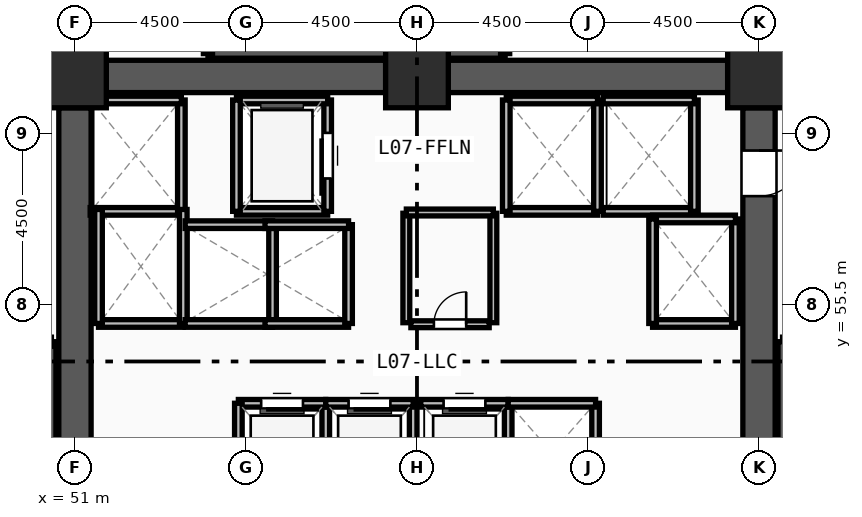
"""IFC4 building model, lengths in metres.
Left out: names, types, materials, properties, quantities, classifications, styles, units other than length and angle.
Written with IfcOpenShell. Run it as: python <this file> out.ifc"""

import sys

from ifc_helpers import new_model, si_unit, direction, frame, frame_2d, origin, origin_2d, place, context, subcontext, project, spatial, rectangle, extrude, source, transform, mapped, element, fill, save


model = new_model("IFC4")
c1 = context("Model", 3, precision=1e-05, world=origin(), true_north=direction((0.0, 1.0)))
c2 = subcontext(c1, "Body", "Model", "MODEL_VIEW")
j1 = project(units=[si_unit("LENGTHUNIT", "METRE"), si_unit("PLANEANGLEUNIT", "RADIAN")], contexts=[c1])
p1 = place(None, origin())
s1 = spatial("IfcSite", under=j1, at=p1, CompositionType="ELEMENT")
p2 = place(p1, origin())
s2 = spatial("IfcBuilding", under=s1, at=p2, CompositionType="ELEMENT")
p3 = place(p2, frame((0.0, 0.0, 28.5)))
s3 = spatial("IfcBuildingStorey", under=s2, at=p3, CompositionType="ELEMENT", Elevation=28.5)
m1 = source(origin(), c2, "Body", "SweptSolid", [
    extrude(rectangle(XDim=1.65, YDim=1.65, at=origin_2d()), origin(), (0.0, 0.0, 1.0), 3.75),
])
for number, where, z_axis, x_axis in (
    (1, (69.0, 61.5, 0.0), (0.0, 0.0, 1.0), (1.0, 0.0, 0.0)),
    (2, (60.0, 61.5, 0.0), (0.0, 0.0, 1.0), (1.0, 0.0, 0.0)),
    (3, (51.0, 61.5, 0.0), (0.0, 0.0, 1.0), (1.0, 0.0, 0.0)),
):
    element("IfcColumn", number, at=place(p3, frame(where, z_axis=z_axis, x_axis=x_axis)), inside=s3, PredefinedType="COLUMN", context=c2, shape_type="MappedRepresentation", body=[
        mapped(m1, transform((0.0, 0.0, 0.0), x_axis=(1.0, 0.0, 0.0), y_axis=(0.0, 1.0, 0.0), z_axis=(0.0, 0.0, 1.0), scale=1.0)),
    ])
for number, where, z_axis, x_axis in (
    (4, (51.825, 61.5, 0.0), (0.0, 0.0, 1.0), (1.0, 0.0, 0.0)),
    (5, (60.825, 61.5, 0.0), (0.0, 0.0, 1.0), (1.0, 0.0, 0.0)),
):
    element("IfcWall", number, at=place(p3, frame(where, z_axis=z_axis, x_axis=x_axis)), inside=s3, PredefinedType="SHEAR", context=c2, shape_type="SweptSolid", body=[
        extrude(rectangle(XDim=7.35, YDim=0.85, at=frame_2d((3.675, 0.0))), origin(), (0.0, 0.0, 1.0), 3.57),
    ])
p4 = place(p3, frame((69.0, 60.675, 0.0), z_axis=(0.0, 0.0, 1.0), x_axis=(0.0, -1.0, 0.0)))
e6 = element("IfcWall", 6, at=p4, inside=s3, PredefinedType="SHEAR", context=c2, shape_type="SweptSolid", body=[
    extrude(rectangle(XDim=13.35, YDim=0.85, at=frame_2d((6.675, 0.0))), origin(), (0.0, 0.0, 1.0), 3.57),
])
m2 = source(origin(), c2, "Body", "SweptSolid", [
    extrude(rectangle(XDim=1.2, YDim=2.2, at=frame_2d((0.6, 1.1))), frame((0.0, 0.435, 0.0), z_axis=(0.0, -1.0, 0.0), x_axis=(1.0, 0.0, 0.0)), (0.0, 0.0, 1.0), 0.87),
])
p5 = place(p4, frame((1.125, 0.0, 0.0)))
e7 = element("IfcOpeningElement", 7, at=p5, cuts=e6, PredefinedType="OPENING", context=c2, shape_type="MappedRepresentation", body=[
    mapped(m2, transform((0.0, 0.0, 0.0), x_axis=(1.0, 0.0, 0.0), y_axis=(0.0, 1.0, 0.0), z_axis=(0.0, 0.0, 1.0), scale=1.0)),
])
p6 = place(p3, frame((51.0, 47.325, 0.0), z_axis=(0.0, 0.0, 1.0), x_axis=(0.0, 1.0, 0.0)))
e8 = element("IfcWall", 8, at=p6, inside=s3, PredefinedType="SHEAR", context=c2, shape_type="SweptSolid", body=[
    extrude(rectangle(XDim=13.35, YDim=0.85, at=frame_2d((6.675, 0.0))), origin(), (0.0, 0.0, 1.0), 3.57),
])
for number, where, z_axis, x_axis in (
    (9, (50.38, 46.7, 0.0), (0.0, 0.0, 1.0), (0.0, 1.0, 0.0)),
    (10, (69.62, 54.52, 0.0), (0.0, 0.0, 1.0), (0.0, -1.0, 0.0)),
    (11, (54.5, 62.1, 0.0), (0.0, 0.0, 1.0), (1.0, 0.0, 0.0)),
):
    element("IfcWall", number, at=place(p3, frame(where, z_axis=z_axis, x_axis=x_axis)), inside=s3, PredefinedType="SOLIDWALL", context=c2, shape_type="SweptSolid", body=[
        extrude(rectangle(XDim=7.82, YDim=0.24, at=frame_2d((3.91, 0.0))), origin(), (0.0, 0.0, 1.0), 3.57),
    ])
for number, where, z_axis, x_axis in (
    (12, (62.32, 62.1, 0.0), (0.0, 0.0, 1.0), (0.0, 1.0, 0.0)),
    (13, (54.5, 65.54, 0.0), (0.0, 0.0, 1.0), (0.0, -1.0, 0.0)),
):
    element("IfcWall", number, at=place(p3, frame(where, z_axis=z_axis, x_axis=x_axis)), inside=s3, PredefinedType="SOLIDWALL", context=c2, shape_type="SweptSolid", body=[
        extrude(rectangle(XDim=3.44, YDim=0.24, at=frame_2d((1.72, 0.0))), origin(), (0.0, 0.0, 1.0), 3.57),
    ])
p7 = place(p3, frame((55.25, 57.95, 0.0), z_axis=(0.0, 0.0, 1.0), x_axis=(1.0, 0.0, 0.0)))
e14 = element("IfcWall", 14, at=p7, inside=s3, PredefinedType="SOLIDWALL", context=c2, shape_type="SweptSolid", body=[
    extrude(rectangle(XDim=2.4, YDim=0.2, at=frame_2d((1.2, 0.0))), origin(), (0.0, 0.0, 1.0), 3.57),
])
p8 = place(p3, frame((57.65, 57.95, 0.0), z_axis=(0.0, 0.0, 1.0), x_axis=(0.0, 1.0, 0.0)))
e15 = element("IfcWall", 15, at=p8, inside=s3, PredefinedType="SOLIDWALL", context=c2, shape_type="SweptSolid", body=[
    extrude(rectangle(XDim=2.93, YDim=0.2, at=frame_2d((1.465, 0.0))), origin(), (0.0, 0.0, 1.0), 3.57),
])
m3 = source(origin(), c2, "Body", "SweptSolid", [
    extrude(rectangle(XDim=1.2, YDim=2.3, at=frame_2d((0.6, 1.15))), frame((0.0, 0.11, 0.0), z_axis=(0.0, -1.0, 0.0), x_axis=(1.0, 0.0, 0.0)), (0.0, 0.0, 1.0), 0.22),
])
p9 = place(p8, frame((0.865, 0.0, 0.0)))
e16 = element("IfcOpeningElement", 16, at=p9, cuts=e15, PredefinedType="OPENING", context=c2, shape_type="MappedRepresentation", body=[
    mapped(m3, transform((0.0, 0.0, 0.0), x_axis=(1.0, 0.0, 0.0), y_axis=(0.0, 1.0, 0.0), z_axis=(0.0, 0.0, 1.0), scale=1.0)),
])
p10 = place(p3, frame((57.65, 60.88, 0.0), z_axis=(0.0, 0.0, 1.0), x_axis=(-1.0, 0.0, 0.0)))
e17 = element("IfcWall", 17, at=p10, inside=s3, PredefinedType="SOLIDWALL", context=c2, shape_type="SweptSolid", body=[
    extrude(rectangle(XDim=2.4, YDim=0.2, at=frame_2d((1.2, 0.0))), origin(), (0.0, 0.0, 1.0), 3.57),
])
p11 = place(p3, frame((55.25, 60.88, 0.0), z_axis=(0.0, 0.0, 1.0), x_axis=(0.0, -1.0, 0.0)))
e18 = element("IfcWall", 18, at=p11, inside=s3, PredefinedType="SOLIDWALL", context=c2, shape_type="SweptSolid", body=[
    extrude(rectangle(XDim=2.93, YDim=0.2, at=frame_2d((1.465, 0.0))), origin(), (0.0, 0.0, 1.0), 3.57),
])
p12 = place(p3, frame((62.35, 57.95, 0.0), z_axis=(0.0, 0.0, 1.0), x_axis=(1.0, 0.0, 0.0)))
e19 = element("IfcWall", 19, at=p12, inside=s3, PredefinedType="SOLIDWALL", context=c2, shape_type="SweptSolid", body=[
    extrude(rectangle(XDim=2.4, YDim=0.2, at=frame_2d((1.2, 0.0))), origin(), (0.0, 0.0, 1.0), 3.57),
])
p13 = place(p3, frame((64.75, 57.95, 0.0), z_axis=(0.0, 0.0, 1.0), x_axis=(0.0, 1.0, 0.0)))
e20 = element("IfcWall", 20, at=p13, inside=s3, PredefinedType="SOLIDWALL", context=c2, shape_type="SweptSolid", body=[
    extrude(rectangle(XDim=2.93, YDim=0.2, at=frame_2d((1.465, 0.0))), origin(), (0.0, 0.0, 1.0), 3.57),
])
p14 = place(p3, frame((64.75, 60.88, 0.0), z_axis=(0.0, 0.0, 1.0), x_axis=(-1.0, 0.0, 0.0)))
e21 = element("IfcWall", 21, at=p14, inside=s3, PredefinedType="SOLIDWALL", context=c2, shape_type="SweptSolid", body=[
    extrude(rectangle(XDim=2.4, YDim=0.2, at=frame_2d((1.2, 0.0))), origin(), (0.0, 0.0, 1.0), 3.57),
])
p15 = place(p3, frame((62.35, 60.88, 0.0), z_axis=(0.0, 0.0, 1.0), x_axis=(0.0, -1.0, 0.0)))
e22 = element("IfcWall", 22, at=p15, inside=s3, PredefinedType="SOLIDWALL", context=c2, shape_type="SweptSolid", body=[
    extrude(rectangle(XDim=2.93, YDim=0.2, at=frame_2d((1.465, 0.0))), origin(), (0.0, 0.0, 1.0), 3.57),
])
p16 = place(p3, frame((64.9, 57.95, 0.0), z_axis=(0.0, 0.0, 1.0), x_axis=(1.0, 0.0, 0.0)))
e23 = element("IfcWall", 23, at=p16, inside=s3, PredefinedType="SOLIDWALL", context=c2, shape_type="SweptSolid", body=[
    extrude(rectangle(XDim=2.4, YDim=0.2, at=frame_2d((1.2, 0.0))), origin(), (0.0, 0.0, 1.0), 3.57),
])
p17 = place(p3, frame((67.3, 57.95, 0.0), z_axis=(0.0, 0.0, 1.0), x_axis=(0.0, 1.0, 0.0)))
e24 = element("IfcWall", 24, at=p17, inside=s3, PredefinedType="SOLIDWALL", context=c2, shape_type="SweptSolid", body=[
    extrude(rectangle(XDim=2.93, YDim=0.2, at=frame_2d((1.465, 0.0))), origin(), (0.0, 0.0, 1.0), 3.57),
])
for number, where, z_axis, x_axis in (
    (25, (67.3, 60.88, 0.0), (0.0, 0.0, 1.0), (-1.0, 0.0, 0.0)),
    (26, (51.4, 57.95, 0.0), (0.0, 0.0, 1.0), (1.0, 0.0, 0.0)),
):
    element("IfcWall", number, at=place(p3, frame(where, z_axis=z_axis, x_axis=x_axis)), inside=s3, PredefinedType="SOLIDWALL", context=c2, shape_type="SweptSolid", body=[
        extrude(rectangle(XDim=2.4, YDim=0.2, at=frame_2d((1.2, 0.0))), origin(), (0.0, 0.0, 1.0), 3.57),
    ])
p18 = place(p3, frame((53.8, 57.95, 0.0), z_axis=(0.0, 0.0, 1.0), x_axis=(0.0, 1.0, 0.0)))
e27 = element("IfcWall", 27, at=p18, inside=s3, PredefinedType="SOLIDWALL", context=c2, shape_type="SweptSolid", body=[
    extrude(rectangle(XDim=2.93, YDim=0.2, at=frame_2d((1.465, 0.0))), origin(), (0.0, 0.0, 1.0), 3.57),
])
p19 = place(p3, frame((53.8, 60.88, 0.0), z_axis=(0.0, 0.0, 1.0), x_axis=(-1.0, 0.0, 0.0)))
e28 = element("IfcWall", 28, at=p19, inside=s3, PredefinedType="SOLIDWALL", context=c2, shape_type="SweptSolid", body=[
    extrude(rectangle(XDim=2.4, YDim=0.2, at=frame_2d((1.2, 0.0))), origin(), (0.0, 0.0, 1.0), 3.57),
])
p20 = place(p3, frame((51.62, 55.0, 0.0), z_axis=(0.0, 0.0, 1.0), x_axis=(1.0, 0.0, 0.0)))
e29 = element("IfcWall", 29, at=p20, inside=s3, PredefinedType="SOLIDWALL", context=c2, shape_type="SweptSolid", body=[
    extrude(rectangle(XDim=2.23, YDim=0.2, at=frame_2d((1.115, 0.0))), origin(), (0.0, 0.0, 1.0), 3.57),
])
for number, where, z_axis, x_axis in (
    (30, (53.85, 55.0, 0.0), (0.0, 0.0, 1.0), (0.0, 1.0, 0.0)),
    (31, (51.62, 58.0, 0.0), (0.0, 0.0, 1.0), (0.0, -1.0, 0.0)),
):
    element("IfcWall", number, at=place(p3, frame(where, z_axis=z_axis, x_axis=x_axis)), inside=s3, PredefinedType="SOLIDWALL", context=c2, shape_type="SweptSolid", body=[
        extrude(rectangle(XDim=3.0, YDim=0.2, at=frame_2d((1.5, 0.0))), origin(), (0.0, 0.0, 1.0), 3.57),
    ])
p21 = place(p3, frame((66.2, 55.0, 0.0), z_axis=(0.0, 0.0, 1.0), x_axis=(1.0, 0.0, 0.0)))
e32 = element("IfcWall", 32, at=p21, inside=s3, PredefinedType="SOLIDWALL", context=c2, shape_type="SweptSolid", body=[
    extrude(rectangle(XDim=2.18, YDim=0.2, at=frame_2d((1.09, 0.0))), origin(), (0.0, 0.0, 1.0), 3.57),
])
p22 = place(p3, frame((68.38, 55.0, 0.0), z_axis=(0.0, 0.0, 1.0), x_axis=(0.0, 1.0, 0.0)))
e33 = element("IfcWall", 33, at=p22, inside=s3, PredefinedType="SOLIDWALL", context=c2, shape_type="SweptSolid", body=[
    extrude(rectangle(XDim=2.75, YDim=0.2, at=frame_2d((1.375, 0.0))), origin(), (0.0, 0.0, 1.0), 3.57),
])
p23 = place(p3, frame((68.38, 57.75, 0.0), z_axis=(0.0, 0.0, 1.0), x_axis=(-1.0, 0.0, 0.0)))
e34 = element("IfcWall", 34, at=p23, inside=s3, PredefinedType="SOLIDWALL", context=c2, shape_type="SweptSolid", body=[
    extrude(rectangle(XDim=2.18, YDim=0.2, at=frame_2d((1.09, 0.0))), origin(), (0.0, 0.0, 1.0), 3.57),
])
p24 = place(p3, frame((66.2, 57.75, 0.0), z_axis=(0.0, 0.0, 1.0), x_axis=(0.0, -1.0, 0.0)))
e35 = element("IfcWall", 35, at=p24, inside=s3, PredefinedType="SOLIDWALL", context=c2, shape_type="SweptSolid", body=[
    extrude(rectangle(XDim=2.75, YDim=0.2, at=frame_2d((1.375, 0.0))), origin(), (0.0, 0.0, 1.0), 3.57),
])
p25 = place(p3, frame((57.6, 50.3, 0.0), z_axis=(0.0, 0.0, 1.0), x_axis=(0.0, 1.0, 0.0)))
e36 = element("IfcWall", 36, at=p25, inside=s3, PredefinedType="SOLIDWALL", context=c2, shape_type="SweptSolid", body=[
    extrude(rectangle(XDim=2.6, YDim=0.2, at=frame_2d((1.3, 0.0))), origin(), (0.0, 0.0, 1.0), 3.57),
])
p26 = place(p3, frame((57.6, 52.9, 0.0), z_axis=(0.0, 0.0, 1.0), x_axis=(-1.0, 0.0, 0.0)))
e37 = element("IfcWall", 37, at=p26, inside=s3, PredefinedType="SOLIDWALL", context=c2, shape_type="SweptSolid", body=[
    extrude(rectangle(XDim=2.3, YDim=0.2, at=frame_2d((1.15, 0.0))), origin(), (0.0, 0.0, 1.0), 3.57),
])
m4 = source(origin(), c2, "Body", "SweptSolid", [
    extrude(rectangle(XDim=1.1, YDim=2.2, at=frame_2d((0.55, 1.1))), frame((0.0, 0.11, 0.0), z_axis=(0.0, -1.0, 0.0), x_axis=(1.0, 0.0, 0.0)), (0.0, 0.0, 1.0), 0.22),
])
p27 = place(p26, frame((0.6, 0.0, 0.0)))
e38 = element("IfcOpeningElement", 38, at=p27, cuts=e37, PredefinedType="OPENING", context=c2, shape_type="MappedRepresentation", body=[
    mapped(m4, transform((0.0, 0.0, 0.0), x_axis=(1.0, 0.0, 0.0), y_axis=(0.0, 1.0, 0.0), z_axis=(0.0, 0.0, 1.0), scale=1.0)),
])
for number, where, z_axis, x_axis in (
    (39, (55.3, 52.9, 0.0), (0.0, 0.0, 1.0), (0.0, -1.0, 0.0)),
    (40, (59.9, 50.3, 0.0), (0.0, 0.0, 1.0), (0.0, 1.0, 0.0)),
):
    element("IfcWall", number, at=place(p3, frame(where, z_axis=z_axis, x_axis=x_axis)), inside=s3, PredefinedType="SOLIDWALL", context=c2, shape_type="SweptSolid", body=[
        extrude(rectangle(XDim=2.6, YDim=0.2, at=frame_2d((1.3, 0.0))), origin(), (0.0, 0.0, 1.0), 3.57),
    ])
p28 = place(p3, frame((59.9, 52.9, 0.0), z_axis=(0.0, 0.0, 1.0), x_axis=(-1.0, 0.0, 0.0)))
e41 = element("IfcWall", 41, at=p28, inside=s3, PredefinedType="SOLIDWALL", context=c2, shape_type="SweptSolid", body=[
    extrude(rectangle(XDim=2.3, YDim=0.2, at=frame_2d((1.15, 0.0))), origin(), (0.0, 0.0, 1.0), 3.57),
])
p29 = place(p28, frame((0.6, 0.0, 0.0)))
e42 = element("IfcOpeningElement", 42, at=p29, cuts=e41, PredefinedType="OPENING", context=c2, shape_type="MappedRepresentation", body=[
    mapped(m4, transform((0.0, 0.0, 0.0), x_axis=(1.0, 0.0, 0.0), y_axis=(0.0, 1.0, 0.0), z_axis=(0.0, 0.0, 1.0), scale=1.0)),
])
p30 = place(p3, frame((62.4, 50.3, 0.0), z_axis=(0.0, 0.0, 1.0), x_axis=(0.0, 1.0, 0.0)))
e43 = element("IfcWall", 43, at=p30, inside=s3, PredefinedType="SOLIDWALL", context=c2, shape_type="SweptSolid", body=[
    extrude(rectangle(XDim=2.6, YDim=0.2, at=frame_2d((1.3, 0.0))), origin(), (0.0, 0.0, 1.0), 3.57),
])
p31 = place(p3, frame((62.4, 52.9, 0.0), z_axis=(0.0, 0.0, 1.0), x_axis=(-1.0, 0.0, 0.0)))
e44 = element("IfcWall", 44, at=p31, inside=s3, PredefinedType="SOLIDWALL", context=c2, shape_type="SweptSolid", body=[
    extrude(rectangle(XDim=2.3, YDim=0.2, at=frame_2d((1.15, 0.0))), origin(), (0.0, 0.0, 1.0), 3.57),
])
p32 = place(p31, frame((0.6, 0.0, 0.0)))
e45 = element("IfcOpeningElement", 45, at=p32, cuts=e44, PredefinedType="OPENING", context=c2, shape_type="MappedRepresentation", body=[
    mapped(m4, transform((0.0, 0.0, 0.0), x_axis=(1.0, 0.0, 0.0), y_axis=(0.0, 1.0, 0.0), z_axis=(0.0, 0.0, 1.0), scale=1.0)),
])
p33 = place(p3, frame((64.7, 50.3, 0.0), z_axis=(0.0, 0.0, 1.0), x_axis=(0.0, 1.0, 0.0)))
e46 = element("IfcWall", 46, at=p33, inside=s3, PredefinedType="SOLIDWALL", context=c2, shape_type="SweptSolid", body=[
    extrude(rectangle(XDim=2.6, YDim=0.2, at=frame_2d((1.3, 0.0))), origin(), (0.0, 0.0, 1.0), 3.57),
])
for number, where, z_axis, x_axis in (
    (47, (64.7, 52.9, 0.0), (0.0, 0.0, 1.0), (-1.0, 0.0, 0.0)),
    (48, (53.9, 55.0, 0.0), (0.0, 0.0, 1.0), (1.0, 0.0, 0.0)),
):
    element("IfcWall", number, at=place(p3, frame(where, z_axis=z_axis, x_axis=x_axis)), inside=s3, PredefinedType="SOLIDWALL", context=c2, shape_type="SweptSolid", body=[
        extrude(rectangle(XDim=2.3, YDim=0.2, at=frame_2d((1.15, 0.0))), origin(), (0.0, 0.0, 1.0), 3.57),
    ])
p34 = place(p3, frame((56.2, 55.0, 0.0), z_axis=(0.0, 0.0, 1.0), x_axis=(0.0, 1.0, 0.0)))
e49 = element("IfcWall", 49, at=p34, inside=s3, PredefinedType="SOLIDWALL", context=c2, shape_type="SweptSolid", body=[
    extrude(rectangle(XDim=2.6, YDim=0.2, at=frame_2d((1.3, 0.0))), origin(), (0.0, 0.0, 1.0), 3.57),
])
p35 = place(p3, frame((56.2, 57.6, 0.0), z_axis=(0.0, 0.0, 1.0), x_axis=(-1.0, 0.0, 0.0)))
e50 = element("IfcWall", 50, at=p35, inside=s3, PredefinedType="SOLIDWALL", context=c2, shape_type="SweptSolid", body=[
    extrude(rectangle(XDim=2.3, YDim=0.2, at=frame_2d((1.15, 0.0))), origin(), (0.0, 0.0, 1.0), 3.57),
])
p36 = place(p3, frame((56.0, 55.0, 0.0), z_axis=(0.0, 0.0, 1.0), x_axis=(1.0, 0.0, 0.0)))
e51 = element("IfcWall", 51, at=p36, inside=s3, PredefinedType="SOLIDWALL", context=c2, shape_type="SweptSolid", body=[
    extrude(rectangle(XDim=2.2, YDim=0.2, at=frame_2d((1.1, 0.0))), origin(), (0.0, 0.0, 1.0), 3.57),
])
p37 = place(p3, frame((58.2, 55.0, 0.0), z_axis=(0.0, 0.0, 1.0), x_axis=(0.0, 1.0, 0.0)))
e52 = element("IfcWall", 52, at=p37, inside=s3, PredefinedType="SOLIDWALL", context=c2, shape_type="SweptSolid", body=[
    extrude(rectangle(XDim=2.6, YDim=0.2, at=frame_2d((1.3, 0.0))), origin(), (0.0, 0.0, 1.0), 3.57),
])
p38 = place(p3, frame((58.2, 57.6, 0.0), z_axis=(0.0, 0.0, 1.0), x_axis=(-1.0, 0.0, 0.0)))
e53 = element("IfcWall", 53, at=p38, inside=s3, PredefinedType="SOLIDWALL", context=c2, shape_type="SweptSolid", body=[
    extrude(rectangle(XDim=2.2, YDim=0.2, at=frame_2d((1.1, 0.0))), origin(), (0.0, 0.0, 1.0), 3.57),
])
p39 = place(p3, frame((59.84, 54.98, 0.0), z_axis=(0.0, 0.0, 1.0), x_axis=(1.0, 0.0, 0.0)))
e54 = element("IfcWall", 54, at=p39, inside=s3, PredefinedType="PARTITIONING", context=c2, shape_type="SweptSolid", body=[
    extrude(rectangle(XDim=2.06, YDim=0.18, at=frame_2d((1.03, 0.0))), origin(), (0.0, 0.0, 1.0), 3.57),
])
m5 = source(origin(), c2, "Body", "SweptSolid", [
    extrude(rectangle(XDim=0.85, YDim=2.1, at=frame_2d((0.425, 1.05))), frame((0.0, 0.1, 0.0), z_axis=(0.0, -1.0, 0.0), x_axis=(1.0, 0.0, 0.0)), (0.0, 0.0, 1.0), 0.2),
])
p40 = place(p39, frame((0.605, 0.0, 0.0)))
e55 = element("IfcOpeningElement", 55, at=p40, cuts=e54, PredefinedType="OPENING", context=c2, shape_type="MappedRepresentation", body=[
    mapped(m5, transform((0.0, 0.0, 0.0), x_axis=(1.0, 0.0, 0.0), y_axis=(0.0, 1.0, 0.0), z_axis=(0.0, 0.0, 1.0), scale=1.0)),
])
for number, where, z_axis, x_axis in (
    (56, (59.72, 55.02, 0.0), (0.0, 0.0, 1.0), (0.0, 1.0, 0.0)),
    (57, (62.01, 55.02, 0.0), (0.0, 0.0, 1.0), (0.0, 1.0, 0.0)),
):
    element("IfcWall", number, at=place(p3, frame(where, z_axis=z_axis, x_axis=x_axis)), inside=s3, PredefinedType="PARTITIONING", context=c2, shape_type="SweptSolid", body=[
        extrude(rectangle(XDim=2.88, YDim=0.18, at=frame_2d((1.44, 0.0))), origin(), (0.0, 0.0, 1.0), 3.57),
    ])
p41 = place(p3, frame((59.72, 57.92, 0.0), z_axis=(0.0, 0.0, 1.0), x_axis=(1.0, 0.0, 0.0)))
e58 = element("IfcWall", 58, at=p41, inside=s3, PredefinedType="PARTITIONING", context=c2, shape_type="SweptSolid", body=[
    extrude(rectangle(XDim=2.29, YDim=0.18, at=frame_2d((1.145, 0.0))), origin(), (0.0, 0.0, 1.0), 3.57),
])
for number, where, z_axis, x_axis in (
    (59, (50.54, 61.95, 0.0), (0.0, 0.0, 1.0), (0.0, 1.0, 0.0)),
    (60, (69.46, 61.95, 0.0), (0.0, 0.0, 1.0), (0.0, 1.0, 0.0)),
):
    element("IfcWall", number, at=place(p3, frame(where, z_axis=z_axis, x_axis=x_axis)), inside=s3, PredefinedType="PARTITIONING", context=c2, shape_type="SweptSolid", body=[
        extrude(rectangle(XDim=3.63, YDim=0.18, at=frame_2d((1.815, 0.0))), origin(), (0.0, 0.0, 1.0), 3.57),
    ])
m6 = source(origin(), c2, "Body", "SweptSolid", [
    extrude(rectangle(XDim=1.2, YDim=2.2, at=frame_2d((0.6, 1.1))), frame((0.0, 0.025, 0.0), z_axis=(0.0, -1.0, 0.0), x_axis=(1.0, 0.0, 0.0)), (0.0, 0.0, 1.0), 0.05),
])
p42 = place(p5, origin())
e61 = element("IfcDoor", 61, at=p42, inside=s3, OperationType="SINGLE_SWING_LEFT", PredefinedType="DOOR", context=c2, shape_type="MappedRepresentation", body=[
    mapped(m6, transform((0.0, 0.0, 0.0), x_axis=(1.0, 0.0, 0.0), y_axis=(0.0, 1.0, 0.0), z_axis=(0.0, 0.0, 1.0), scale=1.0)),
])
fill(e7, e61)
m7 = source(origin(), c2, "Body", "SweptSolid", [
    extrude(rectangle(XDim=1.2, YDim=2.3, at=frame_2d((0.6, 1.15))), frame((0.0, 0.025, 0.0), z_axis=(0.0, -1.0, 0.0), x_axis=(1.0, 0.0, 0.0)), (0.0, 0.0, 1.0), 0.05),
])
p43 = place(p9, origin())
e62 = element("IfcDoor", 62, at=p43, inside=s3, OperationType="SLIDING_TO_LEFT", PredefinedType="DOOR", context=c2, shape_type="MappedRepresentation", body=[
    mapped(m7, transform((0.0, 0.0, 0.0), x_axis=(1.0, 0.0, 0.0), y_axis=(0.0, 1.0, 0.0), z_axis=(0.0, 0.0, 1.0), scale=1.0)),
])
fill(e16, e62)
m8 = source(origin(), c2, "Body", "SweptSolid", [
    extrude(rectangle(XDim=1.1, YDim=2.2, at=frame_2d((0.55, 1.1))), frame((0.0, 0.025, 0.0), z_axis=(0.0, -1.0, 0.0), x_axis=(1.0, 0.0, 0.0)), (0.0, 0.0, 1.0), 0.05),
])
p44 = place(p27, origin())
e63 = element("IfcDoor", 63, at=p44, inside=s3, OperationType="SLIDING_TO_LEFT", PredefinedType="DOOR", context=c2, shape_type="MappedRepresentation", body=[
    mapped(m8, transform((0.0, 0.0, 0.0), x_axis=(1.0, 0.0, 0.0), y_axis=(0.0, 1.0, 0.0), z_axis=(0.0, 0.0, 1.0), scale=1.0)),
])
fill(e38, e63)
p45 = place(p29, origin())
e64 = element("IfcDoor", 64, at=p45, inside=s3, OperationType="SLIDING_TO_LEFT", PredefinedType="DOOR", context=c2, shape_type="MappedRepresentation", body=[
    mapped(m8, transform((0.0, 0.0, 0.0), x_axis=(1.0, 0.0, 0.0), y_axis=(0.0, 1.0, 0.0), z_axis=(0.0, 0.0, 1.0), scale=1.0)),
])
fill(e42, e64)
p46 = place(p32, origin())
e65 = element("IfcDoor", 65, at=p46, inside=s3, OperationType="SLIDING_TO_LEFT", PredefinedType="DOOR", context=c2, shape_type="MappedRepresentation", body=[
    mapped(m8, transform((0.0, 0.0, 0.0), x_axis=(1.0, 0.0, 0.0), y_axis=(0.0, 1.0, 0.0), z_axis=(0.0, 0.0, 1.0), scale=1.0)),
])
fill(e45, e65)
m9 = source(origin(), c2, "Body", "SweptSolid", [
    extrude(rectangle(XDim=0.85, YDim=2.1, at=frame_2d((0.425, 1.05))), frame((0.0, 0.025, 0.0), z_axis=(0.0, -1.0, 0.0), x_axis=(1.0, 0.0, 0.0)), (0.0, 0.0, 1.0), 0.05),
])
p47 = place(p40, origin())
e66 = element("IfcDoor", 66, at=p47, inside=s3, OperationType="SINGLE_SWING_RIGHT", PredefinedType="DOOR", context=c2, shape_type="MappedRepresentation", body=[
    mapped(m9, transform((0.0, 0.0, 0.0), x_axis=(1.0, 0.0, 0.0), y_axis=(0.0, 1.0, 0.0), z_axis=(0.0, 0.0, 1.0), scale=1.0)),
])
fill(e55, e66)
save(model, sys.argv[1])
